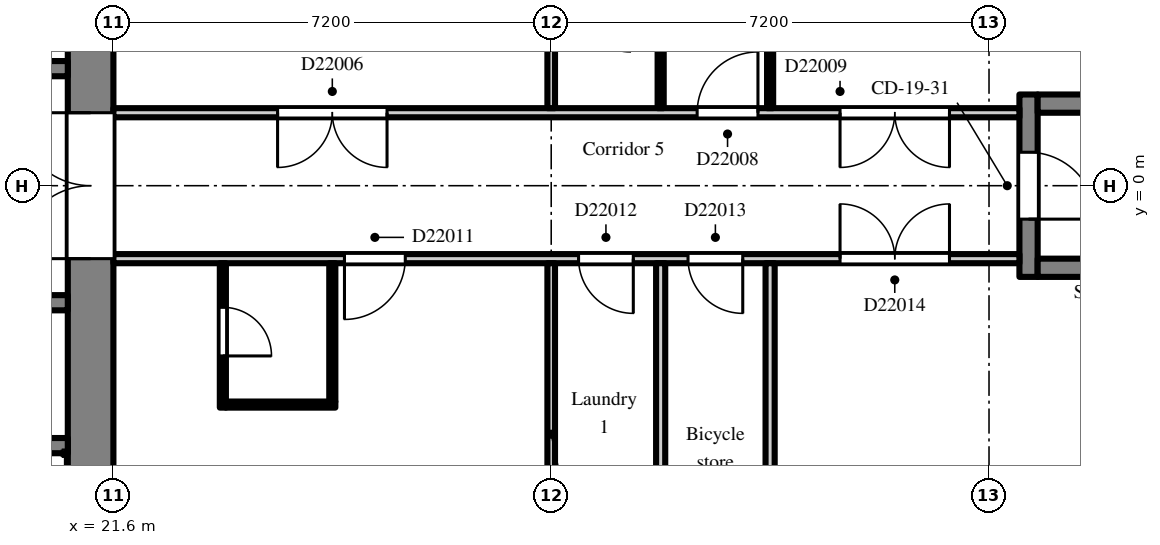
"""IFC4 building model, lengths in metres.
Left out: names, types, materials, properties, quantities, classifications, styles, units other than length and angle.
Written with IfcOpenShell. Run it as: python <this file> out.ifc"""

import sys

from ifc_helpers import new_model, si_unit, direction, frame, frame_2d, origin, place, context, subcontext, project, spatial, rectangle, extrude, element, fill, save


model = new_model("IFC4")
c1 = context("Model", 3, precision=1e-05, world=origin(), true_north=direction((0.0, 1.0)))
c2 = subcontext(c1, "Body", "Model", "MODEL_VIEW")
j1 = project(units=[si_unit("LENGTHUNIT", "METRE"), si_unit("PLANEANGLEUNIT", "RADIAN")], contexts=[c1])
p1 = place(None, origin())
s1 = spatial("IfcSite", under=j1, at=p1, CompositionType="ELEMENT")
p2 = place(p1, origin())
s2 = spatial("IfcBuilding", under=s1, at=p2, CompositionType="ELEMENT")
p3 = place(p2, frame((0.0, 0.0, 159.3)))
s3 = spatial("IfcBuildingStorey", under=s2, at=p3, CompositionType="ELEMENT", Elevation=159.3)
p4 = place(p3, frame((21.225, -7.2, 0.0), z_axis=(0.0, 0.0, 1.0), x_axis=(0.0, 1.0, 0.0)))
e1 = element("IfcWall", 1, at=p4, inside=s3, PredefinedType="SHEAR", context=c2, shape_type="SweptSolid", body=[
    extrude(rectangle(XDim=14.4, YDim=0.75, at=frame_2d((7.2, 0.0))), origin(), (0.0, 0.0, 1.0), 2.55),
])
p5 = place(p4, frame((6.0, 0.0, 0.0)))
e2 = element("IfcOpeningElement", 2, at=p5, cuts=e1, PredefinedType="OPENING", context=c2, shape_type="SweptSolid", body=[
    extrude(rectangle(XDim=2.4, YDim=2.2, at=frame_2d((1.2, 1.1))), frame((0.0, 0.385, 0.0), z_axis=(0.0, -1.0, 0.0), x_axis=(1.0, 0.0, 0.0)), (0.0, 0.0, 1.0), 0.77),
])
p6 = place(p3, frame((7.9, 1.925, 0.0), z_axis=(0.0, 0.0, 1.0), x_axis=(1.0, 0.0, 0.0)))
e3 = element("IfcWall", 3, at=p6, inside=s3, PredefinedType="SHEAR", context=c2, shape_type="SweptSolid", body=[
    extrude(rectangle(XDim=12.95, YDim=0.25, at=frame_2d((6.475, 0.0))), origin(), (0.0, 0.0, 1.0), 2.55),
])
p7 = place(p6, frame((4.825, 0.0, 0.0)))
e4 = element("IfcOpeningElement", 4, at=p7, cuts=e3, PredefinedType="OPENING", context=c2, shape_type="SweptSolid", body=[
    extrude(rectangle(XDim=1.1, YDim=2.1, at=frame_2d((0.55, 1.05))), frame((0.0, 0.135, 0.0), z_axis=(0.0, -1.0, 0.0), x_axis=(1.0, 0.0, 0.0)), (0.0, 0.0, 1.0), 0.27),
])
p8 = place(p6, frame((7.025, 0.0, 0.0)))
e5 = element("IfcOpeningElement", 5, at=p8, cuts=e3, PredefinedType="OPENING", context=c2, shape_type="SweptSolid", body=[
    extrude(rectangle(XDim=1.1, YDim=2.1, at=frame_2d((0.55, 1.05))), frame((0.0, 0.135, 0.0), z_axis=(0.0, -1.0, 0.0), x_axis=(1.0, 0.0, 0.0)), (0.0, 0.0, 1.0), 0.27),
])
p9 = place(p6, frame((9.225, 0.0, 0.0)))
e6 = element("IfcOpeningElement", 6, at=p9, cuts=e3, PredefinedType="OPENING", context=c2, shape_type="SweptSolid", body=[
    extrude(rectangle(XDim=1.1, YDim=2.1, at=frame_2d((0.55, 1.05))), frame((0.0, 0.135, 0.0), z_axis=(0.0, -1.0, 0.0), x_axis=(1.0, 0.0, 0.0)), (0.0, 0.0, 1.0), 0.27),
])
p10 = place(p6, frame((0.525, 0.0, 0.0)))
e7 = element("IfcOpeningElement", 7, at=p10, cuts=e3, PredefinedType="OPENING", context=c2, shape_type="SweptSolid", body=[
    extrude(rectangle(XDim=0.9, YDim=2.1, at=frame_2d((0.45, 1.05))), frame((0.0, 0.135, 0.0), z_axis=(0.0, -1.0, 0.0), x_axis=(1.0, 0.0, 0.0)), (0.0, 0.0, 1.0), 0.27),
])
p11 = place(p6, frame((2.625, 0.0, 0.0)))
e8 = element("IfcOpeningElement", 8, at=p11, cuts=e3, PredefinedType="OPENING", context=c2, shape_type="SweptSolid", body=[
    extrude(rectangle(XDim=1.1, YDim=2.1, at=frame_2d((0.55, 1.05))), frame((0.0, 0.135, 0.0), z_axis=(0.0, -1.0, 0.0), x_axis=(1.0, 0.0, 0.0)), (0.0, 0.0, 1.0), 0.27),
])
p12 = place(p6, frame((11.525, 0.0, 0.0)))
e9 = element("IfcOpeningElement", 9, at=p12, cuts=e3, PredefinedType="OPENING", context=c2, shape_type="SweptSolid", body=[
    extrude(rectangle(XDim=0.9, YDim=2.1, at=frame_2d((0.45, 1.05))), frame((0.0, 0.135, 0.0), z_axis=(0.0, -1.0, 0.0), x_axis=(1.0, 0.0, 0.0)), (0.0, 0.0, 1.0), 0.27),
])
p13 = place(p3, frame((7.9, -1.925, 0.0), z_axis=(0.0, 0.0, 1.0), x_axis=(1.0, 0.0, 0.0)))
e10 = element("IfcWall", 10, at=p13, inside=s3, PredefinedType="SHEAR", context=c2, shape_type="SweptSolid", body=[
    extrude(rectangle(XDim=12.95, YDim=0.25, at=frame_2d((6.475, 0.0))), origin(), (0.0, 0.0, 1.0), 2.55),
])
p14 = place(p13, frame((0.525, 0.0, 0.0)))
e11 = element("IfcOpeningElement", 11, at=p14, cuts=e10, PredefinedType="OPENING", context=c2, shape_type="SweptSolid", body=[
    extrude(rectangle(XDim=0.9, YDim=2.1, at=frame_2d((0.45, 1.05))), frame((0.0, 0.135, 0.0), z_axis=(0.0, -1.0, 0.0), x_axis=(1.0, 0.0, 0.0)), (0.0, 0.0, 1.0), 0.27),
])
p15 = place(p13, frame((2.625, 0.0, 0.0)))
e12 = element("IfcOpeningElement", 12, at=p15, cuts=e10, PredefinedType="OPENING", context=c2, shape_type="SweptSolid", body=[
    extrude(rectangle(XDim=1.1, YDim=2.1, at=frame_2d((0.55, 1.05))), frame((0.0, 0.135, 0.0), z_axis=(0.0, -1.0, 0.0), x_axis=(1.0, 0.0, 0.0)), (0.0, 0.0, 1.0), 0.27),
])
p16 = place(p13, frame((8.225, 0.0, 0.0)))
e13 = element("IfcOpeningElement", 13, at=p16, cuts=e10, PredefinedType="OPENING", context=c2, shape_type="SweptSolid", body=[
    extrude(rectangle(XDim=0.9, YDim=2.1, at=frame_2d((0.45, 1.05))), frame((0.0, 0.135, 0.0), z_axis=(0.0, -1.0, 0.0), x_axis=(1.0, 0.0, 0.0)), (0.0, 0.0, 1.0), 0.27),
])
p17 = place(p3, frame((12.3, -4.275, 0.0), z_axis=(0.0, 0.0, 1.0), x_axis=(1.0, 0.0, 0.0)))
e14 = element("IfcWall", 14, at=p17, inside=s3, PredefinedType="SHEAR", context=c2, shape_type="SweptSolid", body=[
    extrude(rectangle(XDim=8.55, YDim=0.25, at=frame_2d((4.275, 0.0))), origin(), (0.0, 0.0, 1.0), 2.55),
])
p18 = place(p3, frame((36.65, -1.5, 0.0), z_axis=(0.0, 0.0, 1.0), x_axis=(0.0, 1.0, 0.0)))
e15 = element("IfcWall", 15, at=p18, inside=s3, PredefinedType="SHEAR", context=c2, shape_type="SweptSolid", body=[
    extrude(rectangle(XDim=3.0, YDim=0.3, at=frame_2d((1.5, 0.0))), origin(), (0.0, 0.0, 1.0), 2.55),
])
p19 = place(p18, frame((0.95, 0.0, 0.0)))
e16 = element("IfcOpeningElement", 16, at=p19, cuts=e15, PredefinedType="OPENING", context=c2, shape_type="SweptSolid", body=[
    extrude(rectangle(XDim=1.1, YDim=2.1, at=frame_2d((0.55, 1.05))), frame((0.0, 0.16, 0.0), z_axis=(0.0, -1.0, 0.0), x_axis=(1.0, 0.0, 0.0)), (0.0, 0.0, 1.0), 0.32),
])
for number, where, z_axis, x_axis in (
    (17, (36.8, -1.35, 0.0), (0.0, 0.0, 1.0), (1.0, 0.0, 0.0)),
    (18, (36.8, 1.35, 0.0), (0.0, 0.0, 1.0), (1.0, 0.0, 0.0)),
):
    element("IfcWall", number, at=place(p3, frame(where, z_axis=z_axis, x_axis=x_axis)), inside=s3, PredefinedType="SHEAR", context=c2, shape_type="SweptSolid", body=[
        extrude(rectangle(XDim=5.8, YDim=0.3, at=frame_2d((2.9, 0.0))), origin(), (0.0, 0.0, 1.0), 2.55),
    ])
p20 = place(p3, frame((21.6, -1.2, 0.0), z_axis=(0.0, 0.0, 1.0), x_axis=(1.0, 0.0, 0.0)))
e19 = element("IfcWall", 19, at=p20, inside=s3, PredefinedType="PARTITIONING", context=c2, shape_type="SweptSolid", body=[
    extrude(rectangle(XDim=14.9, YDim=0.15, at=frame_2d((7.45, 0.0))), origin(), (0.0, 0.0, 1.0), 2.55),
])
p21 = place(p20, frame((3.8, 0.0, 0.0)))
e20 = element("IfcOpeningElement", 20, at=p21, cuts=e19, PredefinedType="OPENING", context=c2, shape_type="SweptSolid", body=[
    extrude(rectangle(XDim=1.0, YDim=2.1, at=frame_2d((0.5, 1.05))), frame((0.0, 0.085, 0.0), z_axis=(0.0, -1.0, 0.0), x_axis=(1.0, 0.0, 0.0)), (0.0, 0.0, 1.0), 0.17),
])
p22 = place(p20, frame((7.65, 0.0, 0.0)))
e21 = element("IfcOpeningElement", 21, at=p22, cuts=e19, PredefinedType="OPENING", context=c2, shape_type="SweptSolid", body=[
    extrude(rectangle(XDim=0.9, YDim=2.1, at=frame_2d((0.45, 1.05))), frame((0.0, 0.085, 0.0), z_axis=(0.0, -1.0, 0.0), x_axis=(1.0, 0.0, 0.0)), (0.0, 0.0, 1.0), 0.17),
])
p23 = place(p20, frame((9.45, 0.0, 0.0)))
e22 = element("IfcOpeningElement", 22, at=p23, cuts=e19, PredefinedType="OPENING", context=c2, shape_type="SweptSolid", body=[
    extrude(rectangle(XDim=0.9, YDim=2.1, at=frame_2d((0.45, 1.05))), frame((0.0, 0.085, 0.0), z_axis=(0.0, -1.0, 0.0), x_axis=(1.0, 0.0, 0.0)), (0.0, 0.0, 1.0), 0.17),
])
p24 = place(p20, frame((11.95, 0.0, 0.0)))
e23 = element("IfcOpeningElement", 23, at=p24, cuts=e19, PredefinedType="OPENING", context=c2, shape_type="SweptSolid", body=[
    extrude(rectangle(XDim=1.8, YDim=2.1, at=frame_2d((0.9, 1.05))), frame((0.0, 0.085, 0.0), z_axis=(0.0, -1.0, 0.0), x_axis=(1.0, 0.0, 0.0)), (0.0, 0.0, 1.0), 0.17),
])
p25 = place(p3, frame((21.6, 1.2, 0.0), z_axis=(0.0, 0.0, 1.0), x_axis=(1.0, 0.0, 0.0)))
e24 = element("IfcWall", 24, at=p25, inside=s3, PredefinedType="PARTITIONING", context=c2, shape_type="SweptSolid", body=[
    extrude(rectangle(XDim=14.9, YDim=0.15, at=frame_2d((7.45, 0.0))), origin(), (0.0, 0.0, 1.0), 2.55),
])
p26 = place(p25, frame((2.7, 0.0, 0.0)))
e25 = element("IfcOpeningElement", 25, at=p26, cuts=e24, PredefinedType="OPENING", context=c2, shape_type="SweptSolid", body=[
    extrude(rectangle(XDim=1.8, YDim=2.1, at=frame_2d((0.9, 1.05))), frame((0.0, 0.085, 0.0), z_axis=(0.0, -1.0, 0.0), x_axis=(1.0, 0.0, 0.0)), (0.0, 0.0, 1.0), 0.17),
])
p27 = place(p25, frame((9.6, 0.0, 0.0)))
e26 = element("IfcOpeningElement", 26, at=p27, cuts=e24, PredefinedType="OPENING", context=c2, shape_type="SweptSolid", body=[
    extrude(rectangle(XDim=1.0, YDim=2.1, at=frame_2d((0.5, 1.05))), frame((0.0, 0.085, 0.0), z_axis=(0.0, -1.0, 0.0), x_axis=(1.0, 0.0, 0.0)), (0.0, 0.0, 1.0), 0.17),
])
p28 = place(p25, frame((11.95, 0.0, 0.0)))
e27 = element("IfcOpeningElement", 27, at=p28, cuts=e24, PredefinedType="OPENING", context=c2, shape_type="SweptSolid", body=[
    extrude(rectangle(XDim=1.8, YDim=2.1, at=frame_2d((0.9, 1.05))), frame((0.0, 0.085, 0.0), z_axis=(0.0, -1.0, 0.0), x_axis=(1.0, 0.0, 0.0)), (0.0, 0.0, 1.0), 0.17),
])
p29 = place(p3, frame((23.4, -3.65, 0.0), z_axis=(0.0, 0.0, 1.0), x_axis=(0.0, 1.0, 0.0)))
e28 = element("IfcWall", 28, at=p29, inside=s3, PredefinedType="PARTITIONING", context=c2, shape_type="SweptSolid", body=[
    extrude(rectangle(XDim=2.375, YDim=0.1, at=frame_2d((1.188, 0.0))), origin(), (0.0, 0.0, 1.0), 2.55),
])
p30 = place(p29, frame((0.85, 0.0, 0.0)))
e29 = element("IfcOpeningElement", 29, at=p30, cuts=e28, PredefinedType="OPENING", context=c2, shape_type="SweptSolid", body=[
    extrude(rectangle(XDim=0.8, YDim=2.1, at=frame_2d((0.4, 1.05))), frame((0.0, 0.06, 0.0), z_axis=(0.0, -1.0, 0.0), x_axis=(1.0, 0.0, 0.0)), (0.0, 0.0, 1.0), 0.12),
])
p31 = place(p3, frame((23.45, -3.6, 0.0), z_axis=(0.0, 0.0, 1.0), x_axis=(1.0, 0.0, 0.0)))
e30 = element("IfcWall", 30, at=p31, inside=s3, PredefinedType="PARTITIONING", context=c2, shape_type="SweptSolid", body=[
    extrude(rectangle(XDim=1.8, YDim=0.1, at=frame_2d((0.9, 0.0))), origin(), (0.0, 0.0, 1.0), 2.55),
])
p32 = place(p3, frame((25.2, -3.55, 0.0), z_axis=(0.0, 0.0, 1.0), x_axis=(0.0, 1.0, 0.0)))
e31 = element("IfcWall", 31, at=p32, inside=s3, PredefinedType="PARTITIONING", context=c2, shape_type="SweptSolid", body=[
    extrude(rectangle(XDim=2.275, YDim=0.1, at=frame_2d((1.138, 0.0))), origin(), (0.0, 0.0, 1.0), 2.55),
])
p33 = place(p3, frame((28.8, -6.9, 0.0), z_axis=(0.0, 0.0, 1.0), x_axis=(0.0, 1.0, 0.0)))
e32 = element("IfcWall", 32, at=p33, inside=s3, PredefinedType="PARTITIONING", context=c2, shape_type="SweptSolid", body=[
    extrude(rectangle(XDim=5.625, YDim=0.125, at=frame_2d((2.812, 0.0))), origin(), (0.0, 0.0, 1.0), 2.55),
])
p34 = place(p3, frame((28.8, 1.275, 0.0), z_axis=(0.0, 0.0, 1.0), x_axis=(0.0, 1.0, 0.0)))
e33 = element("IfcWall", 33, at=p34, inside=s3, PredefinedType="PARTITIONING", context=c2, shape_type="SweptSolid", body=[
    extrude(rectangle(XDim=1.725, YDim=0.125, at=frame_2d((0.863, 0.0))), origin(), (0.0, 0.0, 1.0), 2.55),
])
p35 = place(p3, frame((30.6, -6.9, 0.0), z_axis=(0.0, 0.0, 1.0), x_axis=(0.0, 1.0, 0.0)))
e34 = element("IfcWall", 34, at=p35, inside=s3, PredefinedType="PARTITIONING", context=c2, shape_type="SweptSolid", body=[
    extrude(rectangle(XDim=5.625, YDim=0.15, at=frame_2d((2.812, 0.0))), origin(), (0.0, 0.0, 1.0), 2.55),
])
p36 = place(p3, frame((30.6, 1.275, 0.0), z_axis=(0.0, 0.0, 1.0), x_axis=(0.0, 1.0, 0.0)))
e35 = element("IfcWall", 35, at=p36, inside=s3, PredefinedType="PARTITIONING", context=c2, shape_type="SweptSolid", body=[
    extrude(rectangle(XDim=1.675, YDim=0.1, at=frame_2d((0.837, 0.0))), origin(), (0.0, 0.0, 1.0), 2.55),
])
p37 = place(p3, frame((32.4, -6.9, 0.0), z_axis=(0.0, 0.0, 1.0), x_axis=(0.0, 1.0, 0.0)))
e36 = element("IfcWall", 36, at=p37, inside=s3, PredefinedType="PARTITIONING", context=c2, shape_type="SweptSolid", body=[
    extrude(rectangle(XDim=5.625, YDim=0.15, at=frame_2d((2.812, 0.0))), origin(), (0.0, 0.0, 1.0), 2.55),
])
p38 = place(p3, frame((32.4, 1.275, 0.0), z_axis=(0.0, 0.0, 1.0), x_axis=(0.0, 1.0, 0.0)))
e37 = element("IfcWall", 37, at=p38, inside=s3, PredefinedType="PARTITIONING", context=c2, shape_type="SweptSolid", body=[
    extrude(rectangle(XDim=5.625, YDim=0.1, at=frame_2d((2.812, 0.0))), origin(), (0.0, 0.0, 1.0), 2.55),
])
p39 = place(p5, origin())
e38 = element("IfcDoor", 38, at=p39, inside=s3, OperationType="DOUBLE_DOOR_DOUBLE_SWING", PredefinedType="DOOR", context=c2, shape_type="SweptSolid", body=[
    extrude(rectangle(XDim=2.4, YDim=2.2, at=frame_2d((1.2, 1.1))), frame((0.0, 0.025, 0.0), z_axis=(0.0, -1.0, 0.0), x_axis=(1.0, 0.0, 0.0)), (0.0, 0.0, 1.0), 0.05),
])
fill(e2, e38)
p40 = place(p19, frame((1.1, 0.0, 0.0), z_axis=(0.0, 0.0, 1.0), x_axis=(-1.0, 0.0, 0.0)))
e39 = element("IfcDoor", 39, at=p40, inside=s3, OperationType="SINGLE_SWING_RIGHT", PredefinedType="DOOR", context=c2, shape_type="SweptSolid", body=[
    extrude(rectangle(XDim=1.1, YDim=2.1, at=frame_2d((0.55, 1.05))), frame((0.0, 0.025, 0.0), z_axis=(0.0, -1.0, 0.0), x_axis=(1.0, 0.0, 0.0)), (0.0, 0.0, 1.0), 0.05),
])
fill(e16, e39)
p41 = place(p26, frame((1.8, 0.0, 0.0), z_axis=(0.0, 0.0, 1.0), x_axis=(-1.0, 0.0, 0.0)))
e40 = element("IfcDoor", 40, at=p41, inside=s3, OperationType="DOUBLE_DOOR_DOUBLE_SWING", PredefinedType="DOOR", context=c2, shape_type="SweptSolid", body=[
    extrude(rectangle(XDim=1.8, YDim=2.1, at=frame_2d((0.9, 1.05))), frame((0.0, 0.025, 0.0), z_axis=(0.0, -1.0, 0.0), x_axis=(1.0, 0.0, 0.0)), (0.0, 0.0, 1.0), 0.05),
])
fill(e25, e40)
p42 = place(p27, origin())
e41 = element("IfcDoor", 41, at=p42, inside=s3, OperationType="SINGLE_SWING_RIGHT", PredefinedType="DOOR", context=c2, shape_type="SweptSolid", body=[
    extrude(rectangle(XDim=1.0, YDim=2.1, at=frame_2d((0.5, 1.05))), frame((0.0, 0.025, 0.0), z_axis=(0.0, -1.0, 0.0), x_axis=(1.0, 0.0, 0.0)), (0.0, 0.0, 1.0), 0.05),
])
fill(e26, e41)
p43 = place(p28, frame((1.8, 0.0, 0.0), z_axis=(0.0, 0.0, 1.0), x_axis=(-1.0, 0.0, 0.0)))
e42 = element("IfcDoor", 42, at=p43, inside=s3, OperationType="DOUBLE_DOOR_DOUBLE_SWING", PredefinedType="DOOR", context=c2, shape_type="SweptSolid", body=[
    extrude(rectangle(XDim=1.8, YDim=2.1, at=frame_2d((0.9, 1.05))), frame((0.0, 0.025, 0.0), z_axis=(0.0, -1.0, 0.0), x_axis=(1.0, 0.0, 0.0)), (0.0, 0.0, 1.0), 0.05),
])
fill(e27, e42)
p44 = place(p30, frame((0.8, 0.0, 0.0), z_axis=(0.0, 0.0, 1.0), x_axis=(-1.0, 0.0, 0.0)))
e43 = element("IfcDoor", 43, at=p44, inside=s3, OperationType="SINGLE_SWING_RIGHT", PredefinedType="DOOR", context=c2, shape_type="SweptSolid", body=[
    extrude(rectangle(XDim=0.8, YDim=2.1, at=frame_2d((0.4, 1.05))), frame((0.0, 0.025, 0.0), z_axis=(0.0, -1.0, 0.0), x_axis=(1.0, 0.0, 0.0)), (0.0, 0.0, 1.0), 0.05),
])
fill(e29, e43)
p45 = place(p21, frame((1.0, 0.0, 0.0), z_axis=(0.0, 0.0, 1.0), x_axis=(-1.0, 0.0, 0.0)))
e44 = element("IfcDoor", 44, at=p45, inside=s3, OperationType="SINGLE_SWING_RIGHT", PredefinedType="DOOR", context=c2, shape_type="SweptSolid", body=[
    extrude(rectangle(XDim=1.0, YDim=2.1, at=frame_2d((0.5, 1.05))), frame((0.0, 0.025, 0.0), z_axis=(0.0, -1.0, 0.0), x_axis=(1.0, 0.0, 0.0)), (0.0, 0.0, 1.0), 0.05),
])
fill(e20, e44)
p46 = place(p22, frame((0.9, 0.0, 0.0), z_axis=(0.0, 0.0, 1.0), x_axis=(-1.0, 0.0, 0.0)))
e45 = element("IfcDoor", 45, at=p46, inside=s3, OperationType="SINGLE_SWING_LEFT", PredefinedType="DOOR", context=c2, shape_type="SweptSolid", body=[
    extrude(rectangle(XDim=0.9, YDim=2.1, at=frame_2d((0.45, 1.05))), frame((0.0, 0.025, 0.0), z_axis=(0.0, -1.0, 0.0), x_axis=(1.0, 0.0, 0.0)), (0.0, 0.0, 1.0), 0.05),
])
fill(e21, e45)
p47 = place(p23, frame((0.9, 0.0, 0.0), z_axis=(0.0, 0.0, 1.0), x_axis=(-1.0, 0.0, 0.0)))
e46 = element("IfcDoor", 46, at=p47, inside=s3, OperationType="SINGLE_SWING_LEFT", PredefinedType="DOOR", context=c2, shape_type="SweptSolid", body=[
    extrude(rectangle(XDim=0.9, YDim=2.1, at=frame_2d((0.45, 1.05))), frame((0.0, 0.025, 0.0), z_axis=(0.0, -1.0, 0.0), x_axis=(1.0, 0.0, 0.0)), (0.0, 0.0, 1.0), 0.05),
])
fill(e22, e46)
p48 = place(p24, origin())
e47 = element("IfcDoor", 47, at=p48, inside=s3, OperationType="DOUBLE_DOOR_DOUBLE_SWING", PredefinedType="DOOR", context=c2, shape_type="SweptSolid", body=[
    extrude(rectangle(XDim=1.8, YDim=2.1, at=frame_2d((0.9, 1.05))), frame((0.0, 0.025, 0.0), z_axis=(0.0, -1.0, 0.0), x_axis=(1.0, 0.0, 0.0)), (0.0, 0.0, 1.0), 0.05),
])
fill(e23, e47)
save(model, sys.argv[1])
